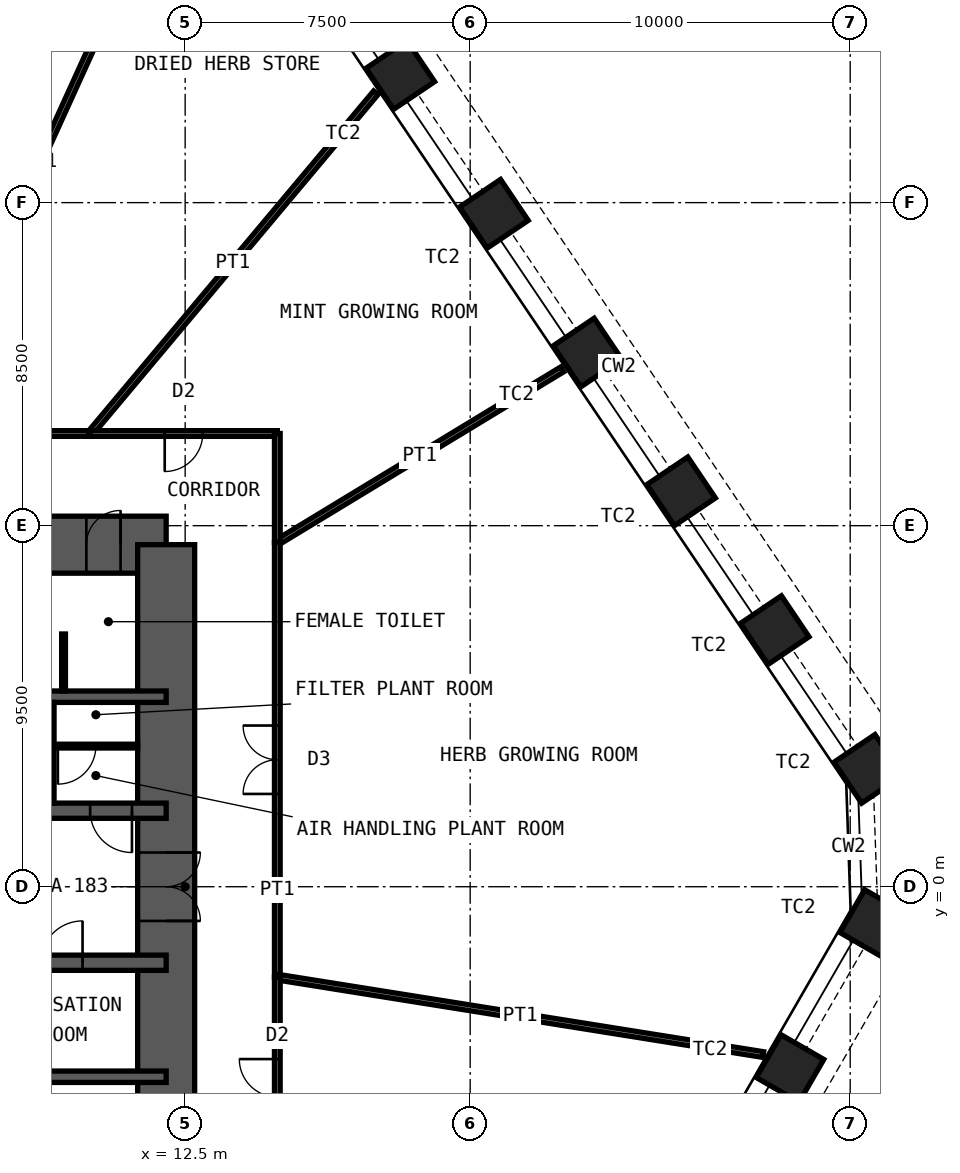
"""IFC4 building model, lengths in metres.
Left out: names, types, materials, properties, quantities, classifications, styles, units other than length and angle.
Written with IfcOpenShell. Run it as: python <this file> out.ifc"""

import sys

from ifc_helpers import new_model, si_unit, direction, frame, frame_2d, origin, origin_2d, place, context, subcontext, project, spatial, rectangle, hollow_rectangle, extrude, element, fill, save


model = new_model("IFC4")
c1 = context("Model", 3, precision=1e-05, world=origin(), true_north=direction((0.0, 1.0)))
c2 = subcontext(c1, "Body", "Model", "MODEL_VIEW")
j1 = project(units=[si_unit("LENGTHUNIT", "METRE"), si_unit("PLANEANGLEUNIT", "RADIAN")], contexts=[c1])
p1 = place(None, origin())
s1 = spatial("IfcSite", under=j1, at=p1, CompositionType="ELEMENT")
p2 = place(p1, origin())
s2 = spatial("IfcBuilding", under=s1, at=p2, CompositionType="ELEMENT")
p3 = place(p2, frame((0.0, 0.0, 57.0)))
s3 = spatial("IfcBuildingStorey", under=s2, at=p3, CompositionType="ELEMENT", Elevation=57.0)
for number, where, z_axis, x_axis in (
    (1, (18.161, 21.359, 0.0), (0.0, 0.0, 1.0), (-0.559, 0.829, 0.0)),
    (2, (20.624, 17.707, 0.0), (0.0, 0.0, 1.0), (-0.559, 0.829, 0.0)),
    (3, (23.087, 14.056, 0.0), (0.0, 0.0, 1.0), (-0.559, 0.829, 0.0)),
    (4, (25.55, 10.404, 0.0), (0.0, 0.0, 1.0), (-0.559, 0.829, 0.0)),
    (5, (28.013, 6.752, 0.0), (0.0, 0.0, 1.0), (-0.559, 0.829, 0.0)),
    (6, (30.476, 3.101, 0.0), (0.0, 0.0, 1.0), (-0.559, 0.829, 0.0)),
    (7, (30.618, -0.967, 0.0), (0.0, 0.0, 1.0), (0.5, 0.866, 0.0)),
    (8, (28.416, -4.782, 0.0), (0.0, 0.0, 1.0), (0.5, 0.866, 0.0)),
):
    element("IfcColumn", number, at=place(p3, frame(where, z_axis=z_axis, x_axis=x_axis)), inside=s3, PredefinedType="COLUMN", context=c2, shape_type="SweptSolid", body=[
        extrude(hollow_rectangle(XDim=1.3, YDim=1.3, WallThickness=0.1, at=origin_2d()), origin(), (0.0, 0.0, 1.0), 5.0),
    ])
p4 = place(p3, frame((-12.0, 9.0, 0.0), z_axis=(0.0, 0.0, 1.0), x_axis=(1.0, 0.0, 0.0)))
e9 = element("IfcWall", 9, at=p4, inside=s3, PredefinedType="SHEAR", context=c2, shape_type="SweptSolid", body=[
    extrude(rectangle(XDim=24.0, YDim=1.5, at=frame_2d((12.0, 0.0))), origin(), (0.0, 0.0, 1.0), 5.0),
])
p5 = place(p4, frame((10.4, 0.0, 0.0)))
e10 = element("IfcOpeningElement", 10, at=p5, cuts=e9, PredefinedType="OPENING", context=c2, shape_type="SweptSolid", body=[
    extrude(rectangle(XDim=1.0, YDim=2.1, at=frame_2d((0.5, 1.05))), frame((0.0, 0.76, 0.0), z_axis=(0.0, -1.0, 0.0), x_axis=(1.0, 0.0, 0.0)), (0.0, 0.0, 1.0), 1.52),
])
p6 = place(p4, frame((17.6, 0.0, 0.0)))
e11 = element("IfcOpeningElement", 11, at=p6, cuts=e9, PredefinedType="OPENING", context=c2, shape_type="SweptSolid", body=[
    extrude(rectangle(XDim=0.9, YDim=2.1, at=frame_2d((0.45, 1.05))), frame((0.0, 0.76, 0.0), z_axis=(0.0, -1.0, 0.0), x_axis=(1.0, 0.0, 0.0)), (0.0, 0.0, 1.0), 1.52),
])
p7 = place(p4, frame((21.9, 0.0, 0.0)))
e12 = element("IfcOpeningElement", 12, at=p7, cuts=e9, PredefinedType="OPENING", context=c2, shape_type="SweptSolid", body=[
    extrude(rectangle(XDim=0.9, YDim=2.1, at=frame_2d((0.45, 1.05))), frame((0.0, 0.76, 0.0), z_axis=(0.0, -1.0, 0.0), x_axis=(1.0, 0.0, 0.0)), (0.0, 0.0, 1.0), 1.52),
])
p8 = place(p3, frame((12.0, -9.0, 0.0), z_axis=(0.0, 0.0, 1.0), x_axis=(0.0, 1.0, 0.0)))
e13 = element("IfcWall", 13, at=p8, inside=s3, PredefinedType="SHEAR", context=c2, shape_type="SweptSolid", body=[
    extrude(rectangle(XDim=18.0, YDim=1.5, at=frame_2d((9.0, 0.0))), origin(), (0.0, 0.0, 1.0), 5.0),
])
p9 = place(p8, frame((8.1, 0.0, 0.0)))
e14 = element("IfcOpeningElement", 14, at=p9, cuts=e13, PredefinedType="OPENING", context=c2, shape_type="SweptSolid", body=[
    extrude(rectangle(XDim=1.8, YDim=2.1, at=frame_2d((0.9, 1.05))), frame((0.0, 0.76, 0.0), z_axis=(0.0, -1.0, 0.0), x_axis=(1.0, 0.0, 0.0)), (0.0, 0.0, 1.0), 1.52),
])
p10 = place(p3, frame((-12.0, 5.0, 0.0), z_axis=(0.0, 0.0, 1.0), x_axis=(1.0, 0.0, 0.0)))
e15 = element("IfcWall", 15, at=p10, inside=s3, PredefinedType="SHEAR", context=c2, shape_type="SweptSolid", body=[
    extrude(rectangle(XDim=24.0, YDim=0.3, at=frame_2d((12.0, 0.0))), origin(), (0.0, 0.0, 1.0), 5.0),
])
p11 = place(p3, frame((-12.0, 2.0, 0.0), z_axis=(0.0, 0.0, 1.0), x_axis=(1.0, 0.0, 0.0)))
e16 = element("IfcWall", 16, at=p11, inside=s3, PredefinedType="SHEAR", context=c2, shape_type="SweptSolid", body=[
    extrude(rectangle(XDim=24.0, YDim=0.4, at=frame_2d((12.0, 0.0))), origin(), (0.0, 0.0, 1.0), 5.0),
])
p12 = place(p11, frame((2.4, 0.0, 0.0)))
e17 = element("IfcOpeningElement", 17, at=p12, cuts=e16, PredefinedType="OPENING", context=c2, shape_type="SweptSolid", body=[
    extrude(rectangle(XDim=1.1, YDim=2.1, at=frame_2d((0.55, 1.05))), frame((0.0, 0.21, 0.0), z_axis=(0.0, -1.0, 0.0), x_axis=(1.0, 0.0, 0.0)), (0.0, 0.0, 1.0), 0.42),
])
p13 = place(p11, frame((22.0, 0.0, 0.0)))
e18 = element("IfcOpeningElement", 18, at=p13, cuts=e16, PredefinedType="OPENING", context=c2, shape_type="SweptSolid", body=[
    extrude(rectangle(XDim=1.1, YDim=2.1, at=frame_2d((0.55, 1.05))), frame((0.0, 0.21, 0.0), z_axis=(0.0, -1.0, 0.0), x_axis=(1.0, 0.0, 0.0)), (0.0, 0.0, 1.0), 0.42),
])
p14 = place(p11, frame((10.15, 0.0, 0.0)))
e19 = element("IfcOpeningElement", 19, at=p14, cuts=e16, PredefinedType="OPENING", context=c2, shape_type="SweptSolid", body=[
    extrude(rectangle(XDim=1.0, YDim=2.1, at=frame_2d((0.5, 1.05))), frame((0.0, 0.21, 0.0), z_axis=(0.0, -1.0, 0.0), x_axis=(1.0, 0.0, 0.0)), (0.0, 0.0, 1.0), 0.42),
])
p15 = place(p11, frame((6.7, 0.0, 0.0)))
e20 = element("IfcOpeningElement", 20, at=p15, cuts=e16, PredefinedType="OPENING", context=c2, shape_type="SweptSolid", body=[
    extrude(rectangle(XDim=1.4, YDim=2.4, at=frame_2d((0.7, 1.2))), frame((0.0, 0.21, 0.0), z_axis=(0.0, -1.0, 0.0), x_axis=(1.0, 0.0, 0.0)), (0.0, 0.0, 1.0), 0.42),
])
p16 = place(p11, frame((13.35, 0.0, 0.0)))
e21 = element("IfcOpeningElement", 21, at=p16, cuts=e16, PredefinedType="OPENING", context=c2, shape_type="SweptSolid", body=[
    extrude(rectangle(XDim=1.1, YDim=2.4, at=frame_2d((0.55, 1.2))), frame((0.0, 0.21, 0.0), z_axis=(0.0, -1.0, 0.0), x_axis=(1.0, 0.0, 0.0)), (0.0, 0.0, 1.0), 0.42),
])
p17 = place(p11, frame((16.15, 0.0, 0.0)))
e22 = element("IfcOpeningElement", 22, at=p17, cuts=e16, PredefinedType="OPENING", context=c2, shape_type="SweptSolid", body=[
    extrude(rectangle(XDim=1.1, YDim=2.4, at=frame_2d((0.55, 1.2))), frame((0.0, 0.21, 0.0), z_axis=(0.0, -1.0, 0.0), x_axis=(1.0, 0.0, 0.0)), (0.0, 0.0, 1.0), 0.42),
])
p18 = place(p11, frame((18.95, 0.0, 0.0)))
e23 = element("IfcOpeningElement", 23, at=p18, cuts=e16, PredefinedType="OPENING", context=c2, shape_type="SweptSolid", body=[
    extrude(rectangle(XDim=1.1, YDim=2.4, at=frame_2d((0.55, 1.2))), frame((0.0, 0.21, 0.0), z_axis=(0.0, -1.0, 0.0), x_axis=(1.0, 0.0, 0.0)), (0.0, 0.0, 1.0), 0.42),
])
p19 = place(p3, frame((-12.0, -2.0, 0.0), z_axis=(0.0, 0.0, 1.0), x_axis=(1.0, 0.0, 0.0)))
e24 = element("IfcWall", 24, at=p19, inside=s3, PredefinedType="SHEAR", context=c2, shape_type="SweptSolid", body=[
    extrude(rectangle(XDim=24.0, YDim=0.4, at=frame_2d((12.0, 0.0))), origin(), (0.0, 0.0, 1.0), 5.0),
])
p20 = place(p19, frame((1.1, 0.0, 0.0)))
e25 = element("IfcOpeningElement", 25, at=p20, cuts=e24, PredefinedType="OPENING", context=c2, shape_type="SweptSolid", body=[
    extrude(rectangle(XDim=1.1, YDim=2.1, at=frame_2d((0.55, 1.05))), frame((0.0, 0.21, 0.0), z_axis=(0.0, -1.0, 0.0), x_axis=(1.0, 0.0, 0.0)), (0.0, 0.0, 1.0), 0.42),
])
p21 = place(p19, frame((13.55, 0.0, 0.0)))
e26 = element("IfcOpeningElement", 26, at=p21, cuts=e24, PredefinedType="OPENING", context=c2, shape_type="SweptSolid", body=[
    extrude(rectangle(XDim=1.1, YDim=2.1, at=frame_2d((0.55, 1.05))), frame((0.0, 0.21, 0.0), z_axis=(0.0, -1.0, 0.0), x_axis=(1.0, 0.0, 0.0)), (0.0, 0.0, 1.0), 0.42),
])
p22 = place(p19, frame((20.7, 0.0, 0.0)))
e27 = element("IfcOpeningElement", 27, at=p22, cuts=e24, PredefinedType="OPENING", context=c2, shape_type="SweptSolid", body=[
    extrude(rectangle(XDim=1.1, YDim=2.1, at=frame_2d((0.55, 1.05))), frame((0.0, 0.21, 0.0), z_axis=(0.0, -1.0, 0.0), x_axis=(1.0, 0.0, 0.0)), (0.0, 0.0, 1.0), 0.42),
])
p23 = place(p3, frame((-12.0, -5.0, 0.0), z_axis=(0.0, 0.0, 1.0), x_axis=(1.0, 0.0, 0.0)))
e28 = element("IfcWall", 28, at=p23, inside=s3, PredefinedType="SHEAR", context=c2, shape_type="SweptSolid", body=[
    extrude(rectangle(XDim=24.0, YDim=0.3, at=frame_2d((12.0, 0.0))), origin(), (0.0, 0.0, 1.0), 5.0),
])
p24 = place(p3, frame((8.9, 2.2, 0.0), z_axis=(0.0, 0.0, 1.0), x_axis=(0.0, 1.0, 0.0)))
e29 = element("IfcWall", 29, at=p24, inside=s3, PredefinedType="PARTITIONING", context=c2, shape_type="SweptSolid", body=[
    extrude(rectangle(XDim=2.65, YDim=0.3, at=frame_2d((1.325, 0.0))), origin(), (0.0, 0.0, 1.0), 4.78),
])
p25 = place(p3, frame((9.05, 3.7, 0.0), z_axis=(0.0, 0.0, 1.0), x_axis=(1.0, 0.0, 0.0)))
e30 = element("IfcWall", 30, at=p25, inside=s3, PredefinedType="PARTITIONING", context=c2, shape_type="SweptSolid", body=[
    extrude(rectangle(XDim=2.2, YDim=0.1, at=frame_2d((1.1, 0.0))), origin(), (0.0, 0.0, 1.0), 4.78),
])
p26 = place(p25, frame((0.1, 0.0, 0.0)))
e31 = element("IfcOpeningElement", 31, at=p26, cuts=e30, PredefinedType="OPENING", context=c2, shape_type="SweptSolid", body=[
    extrude(rectangle(XDim=1.0, YDim=2.4, at=frame_2d((0.5, 1.2))), frame((0.0, 0.06, 0.0), z_axis=(0.0, -1.0, 0.0), x_axis=(1.0, 0.0, 0.0)), (0.0, 0.0, 1.0), 0.12),
])
p27 = place(p3, frame((9.3, 5.15, 0.0), z_axis=(0.0, 0.0, 1.0), x_axis=(0.0, 1.0, 0.0)))
e32 = element("IfcWall", 32, at=p27, inside=s3, PredefinedType="PARTITIONING", context=c2, shape_type="SweptSolid", body=[
    extrude(rectangle(XDim=1.5, YDim=0.1, at=frame_2d((0.75, 0.0))), origin(), (0.0, 0.0, 1.0), 2.1),
])
p28 = place(p3, frame((22.421, 13.612, 0.0), z_axis=(0.0, 0.0, 1.0), x_axis=(-0.854791484761, -0.518971596121, 0.0)))
e33 = element("IfcWall", 33, at=p28, inside=s3, PredefinedType="PARTITIONING", context=c2, shape_type="SweptSolid", body=[
    extrude(rectangle(XDim=8.77, YDim=0.15, at=frame_2d((4.385, 0.0))), origin(), (0.0, 0.0, 1.0), 3.7),
])
p29 = place(p3, frame((14.925, 9.061, 0.0), z_axis=(0.0, 0.0, 1.0), x_axis=(0.0, -1.0, 0.0)))
e34 = element("IfcWall", 34, at=p29, inside=s3, PredefinedType="PARTITIONING", context=c2, shape_type="SweptSolid", body=[
    extrude(rectangle(XDim=11.439, YDim=0.15, at=frame_2d((5.72, 0.0))), origin(), (0.0, 0.0, 1.0), 4.8),
])
p30 = place(p29, frame((4.82, 0.0, 0.0)))
e35 = element("IfcOpeningElement", 35, at=p30, cuts=e34, PredefinedType="OPENING", context=c2, shape_type="SweptSolid", body=[
    extrude(rectangle(XDim=1.8, YDim=2.4, at=frame_2d((0.9, 1.2))), frame((0.0, 0.085, 0.0), z_axis=(0.0, -1.0, 0.0), x_axis=(1.0, 0.0, 0.0)), (0.0, 0.0, 1.0), 0.17),
])
p31 = place(p3, frame((27.711, -4.416, 0.0), z_axis=(0.0, 0.0, 1.0), x_axis=(-0.987539045088, 0.157374186021, 0.0)))
e36 = element("IfcWall", 36, at=p31, inside=s3, PredefinedType="PARTITIONING", context=c2, shape_type="SweptSolid", body=[
    extrude(rectangle(XDim=12.948, YDim=0.15, at=frame_2d((6.474, 0.0))), origin(), (0.0, 0.0, 1.0), 3.7),
])
p32 = place(p3, frame((14.925, -2.378, 0.0), z_axis=(0.0, 0.0, 1.0), x_axis=(0.0, -1.0, 0.0)))
e37 = element("IfcWall", 37, at=p32, inside=s3, PredefinedType="PARTITIONING", context=c2, shape_type="SweptSolid", body=[
    extrude(rectangle(XDim=5.312, YDim=0.15, at=frame_2d((2.656, 0.0))), origin(), (0.0, 0.0, 1.0), 4.8),
])
p33 = place(p32, frame((2.156, 0.0, 0.0)))
e38 = element("IfcOpeningElement", 38, at=p33, cuts=e37, PredefinedType="OPENING", context=c2, shape_type="SweptSolid", body=[
    extrude(rectangle(XDim=1.0, YDim=2.4, at=frame_2d((0.5, 1.2))), frame((0.0, 0.085, 0.0), z_axis=(0.0, -1.0, 0.0), x_axis=(1.0, 0.0, 0.0)), (0.0, 0.0, 1.0), 0.17),
])
p34 = place(p3, frame((11.915, 26.209, 0.0), z_axis=(0.0, 0.0, 1.0), x_axis=(-0.4138533524, -0.910343563007, 0.0)))
e39 = element("IfcWall", 39, at=p34, inside=s3, PredefinedType="PARTITIONING", context=c2, shape_type="SweptSolid", body=[
    extrude(rectangle(XDim=15.691, YDim=0.15, at=frame_2d((7.845, 0.0))), origin(), (0.0, 0.0, 1.0), 3.7),
])
p35 = place(p3, frame((5.421, 11.925, 0.0), z_axis=(0.0, 0.0, 1.0), x_axis=(1.0, 0.0, 0.0)))
e40 = element("IfcWall", 40, at=p35, inside=s3, PredefinedType="PARTITIONING", context=c2, shape_type="SweptSolid", body=[
    extrude(rectangle(XDim=4.578, YDim=0.15, at=frame_2d((2.289, 0.0))), origin(), (0.0, 0.0, 1.0), 4.8),
])
p36 = place(p35, frame((1.789, 0.0, 0.0)))
e41 = element("IfcOpeningElement", 41, at=p36, cuts=e40, PredefinedType="OPENING", context=c2, shape_type="SweptSolid", body=[
    extrude(rectangle(XDim=1.0, YDim=2.4, at=frame_2d((0.5, 1.2))), frame((0.0, 0.085, 0.0), z_axis=(0.0, -1.0, 0.0), x_axis=(1.0, 0.0, 0.0)), (0.0, 0.0, 1.0), 0.17),
])
p37 = place(p3, frame((17.517, 20.891, 0.0), z_axis=(0.0, 0.0, 1.0), x_axis=(-0.642515050703, -0.766273064658, 0.0)))
e42 = element("IfcWall", 42, at=p37, inside=s3, PredefinedType="PARTITIONING", context=c2, shape_type="SweptSolid", body=[
    extrude(rectangle(XDim=11.7, YDim=0.15, at=frame_2d((5.85, 0.0))), origin(), (0.0, 0.0, 1.0), 3.7),
])
p38 = place(p3, frame((9.999, 11.925, 0.0), z_axis=(0.0, 0.0, 1.0), x_axis=(1.0, 0.0, 0.0)))
e43 = element("IfcWall", 43, at=p38, inside=s3, PredefinedType="PARTITIONING", context=c2, shape_type="SweptSolid", body=[
    extrude(rectangle(XDim=4.926, YDim=0.15, at=frame_2d((2.463, 0.0))), origin(), (0.0, 0.0, 1.0), 4.8),
])
p39 = place(p38, frame((1.963, 0.0, 0.0)))
e44 = element("IfcOpeningElement", 44, at=p39, cuts=e43, PredefinedType="OPENING", context=c2, shape_type="SweptSolid", body=[
    extrude(rectangle(XDim=1.0, YDim=2.4, at=frame_2d((0.5, 1.2))), frame((0.0, 0.085, 0.0), z_axis=(0.0, -1.0, 0.0), x_axis=(1.0, 0.0, 0.0)), (0.0, 0.0, 1.0), 0.17),
])
p40 = place(p3, frame((14.925, 11.925, 0.0), z_axis=(0.0, 0.0, 1.0), x_axis=(0.0, -1.0, 0.0)))
e45 = element("IfcWall", 45, at=p40, inside=s3, PredefinedType="PARTITIONING", context=c2, shape_type="SweptSolid", body=[
    extrude(rectangle(XDim=2.864, YDim=0.15, at=frame_2d((1.432, 0.0))), origin(), (0.0, 0.0, 1.0), 4.8),
])
p41 = place(p7, origin())
e46 = element("IfcDoor", 46, at=p41, inside=s3, OperationType="SINGLE_SWING_LEFT", PredefinedType="DOOR", context=c2, shape_type="SweptSolid", body=[
    extrude(rectangle(XDim=0.9, YDim=2.1, at=frame_2d((0.45, 1.05))), frame((0.0, 0.025, 0.0), z_axis=(0.0, -1.0, 0.0), x_axis=(1.0, 0.0, 0.0)), (0.0, 0.0, 1.0), 0.05),
])
fill(e12, e46)
p42 = place(p13, origin())
e47 = element("IfcDoor", 47, at=p42, inside=s3, OperationType="SINGLE_SWING_RIGHT", PredefinedType="DOOR", context=c2, shape_type="SweptSolid", body=[
    extrude(rectangle(XDim=1.1, YDim=2.1, at=frame_2d((0.55, 1.05))), frame((0.0, 0.025, 0.0), z_axis=(0.0, -1.0, 0.0), x_axis=(1.0, 0.0, 0.0)), (0.0, 0.0, 1.0), 0.05),
])
fill(e18, e47)
p43 = place(p22, origin())
e48 = element("IfcDoor", 48, at=p43, inside=s3, OperationType="SINGLE_SWING_LEFT", PredefinedType="DOOR", context=c2, shape_type="SweptSolid", body=[
    extrude(rectangle(XDim=1.1, YDim=2.1, at=frame_2d((0.55, 1.05))), frame((0.0, 0.025, 0.0), z_axis=(0.0, -1.0, 0.0), x_axis=(1.0, 0.0, 0.0)), (0.0, 0.0, 1.0), 0.05),
])
fill(e27, e48)
p44 = place(p9, origin())
e49 = element("IfcDoor", 49, at=p44, inside=s3, OperationType="DOUBLE_DOOR_DOUBLE_SWING", PredefinedType="DOOR", context=c2, shape_type="SweptSolid", body=[
    extrude(rectangle(XDim=1.8, YDim=2.1, at=frame_2d((0.9, 1.05))), frame((0.0, 0.025, 0.0), z_axis=(0.0, -1.0, 0.0), x_axis=(1.0, 0.0, 0.0)), (0.0, 0.0, 1.0), 0.05),
])
fill(e14, e49)
p45 = place(p26, origin())
e50 = element("IfcDoor", 50, at=p45, inside=s3, OperationType="SINGLE_SWING_LEFT", PredefinedType="DOOR", context=c2, shape_type="SweptSolid", body=[
    extrude(rectangle(XDim=1.0, YDim=2.4, at=frame_2d((0.5, 1.2))), frame((0.0, 0.025, 0.0), z_axis=(0.0, -1.0, 0.0), x_axis=(1.0, 0.0, 0.0)), (0.0, 0.0, 1.0), 0.05),
])
fill(e31, e50)
p46 = place(p30, origin())
e51 = element("IfcDoor", 51, at=p46, inside=s3, OperationType="DOUBLE_DOOR_DOUBLE_SWING", PredefinedType="DOOR", context=c2, shape_type="SweptSolid", body=[
    extrude(rectangle(XDim=1.8, YDim=2.4, at=frame_2d((0.9, 1.2))), frame((0.0, 0.025, 0.0), z_axis=(0.0, -1.0, 0.0), x_axis=(1.0, 0.0, 0.0)), (0.0, 0.0, 1.0), 0.05),
])
fill(e35, e51)
p47 = place(p33, origin())
e52 = element("IfcDoor", 52, at=p47, inside=s3, OperationType="SINGLE_SWING_LEFT", PredefinedType="DOOR", context=c2, shape_type="SweptSolid", body=[
    extrude(rectangle(XDim=1.0, YDim=2.4, at=frame_2d((0.5, 1.2))), frame((0.0, 0.025, 0.0), z_axis=(0.0, -1.0, 0.0), x_axis=(1.0, 0.0, 0.0)), (0.0, 0.0, 1.0), 0.05),
])
fill(e38, e52)
p48 = place(p39, origin())
e53 = element("IfcDoor", 53, at=p48, inside=s3, OperationType="SINGLE_SWING_LEFT", PredefinedType="DOOR", context=c2, shape_type="SweptSolid", body=[
    extrude(rectangle(XDim=1.0, YDim=2.4, at=frame_2d((0.5, 1.2))), frame((0.0, 0.025, 0.0), z_axis=(0.0, -1.0, 0.0), x_axis=(1.0, 0.0, 0.0)), (0.0, 0.0, 1.0), 0.05),
])
fill(e44, e53)
save(model, sys.argv[1])
